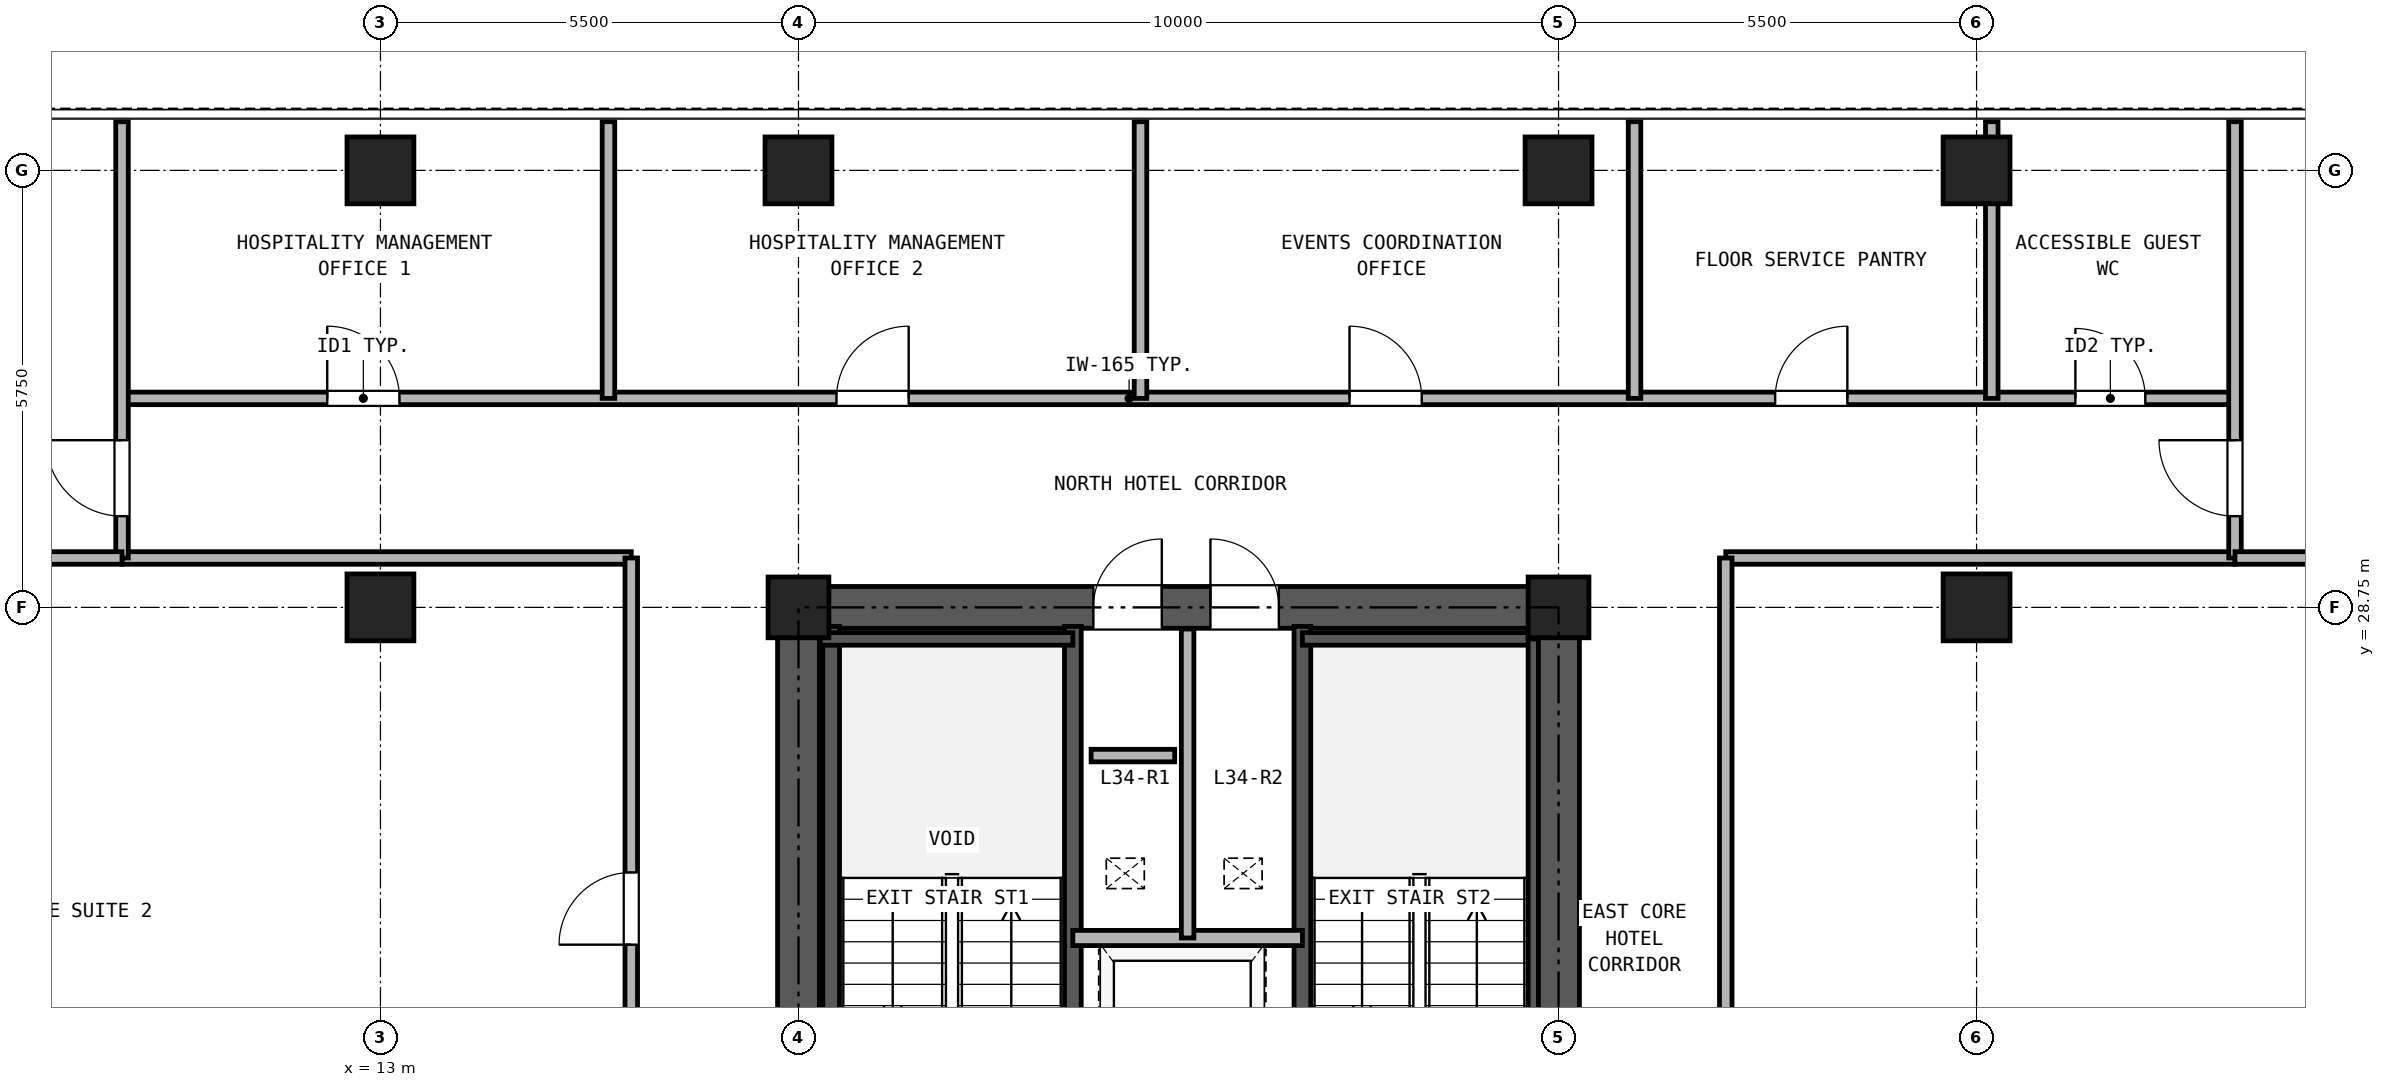
"""IFC4 building model, lengths in metres.
Left out: names, types, materials, properties, quantities, classifications, styles, units other than length and angle.
Written with IfcOpenShell. Run it as: python <this file> out.ifc"""

import sys

from ifc_helpers import new_model, si_unit, direction, frame, frame_2d, origin, origin_2d, place, context, subcontext, project, spatial, rectangle, hollow_rectangle, extrude, source, transform, mapped, element, fill, save


model = new_model("IFC4")
c1 = context("Model", 3, precision=1e-05, world=origin(), true_north=direction((0.0, 1.0)))
c2 = subcontext(c1, "Body", "Model", "MODEL_VIEW")
j1 = project(units=[si_unit("LENGTHUNIT", "METRE"), si_unit("PLANEANGLEUNIT", "RADIAN")], contexts=[c1])
p1 = place(None, origin())
s1 = spatial("IfcSite", under=j1, at=p1, CompositionType="ELEMENT")
p2 = place(p1, origin())
s2 = spatial("IfcBuilding", under=s1, at=p2, CompositionType="ELEMENT")
p3 = place(p2, frame((0.0, 0.0, 124.7)))
s3 = spatial("IfcBuildingStorey", under=s2, at=p3, CompositionType="ELEMENT", Elevation=124.7)
m1 = source(origin(), c2, "Body", "SweptSolid", [
    extrude(hollow_rectangle(XDim=0.88, YDim=0.88, WallThickness=0.05, at=origin_2d()), origin(), (0.0, 0.0, 1.0), 2.95),
])
for number, where, z_axis, x_axis in (
    (1, (13.0, 34.5, 0.0), (0.0, 0.0, 1.0), (1.0, 0.0, 0.0)),
    (2, (18.5, 34.5, 0.0), (0.0, 0.0, 1.0), (1.0, 0.0, 0.0)),
    (3, (28.5, 34.5, 0.0), (0.0, 0.0, 1.0), (1.0, 0.0, 0.0)),
    (4, (34.0, 34.5, 0.0), (0.0, 0.0, 1.0), (1.0, 0.0, 0.0)),
    (5, (13.0, 28.75, 0.0), (0.0, 0.0, 1.0), (1.0, 0.0, 0.0)),
):
    element("IfcColumn", number, at=place(p3, frame(where, z_axis=z_axis, x_axis=x_axis)), inside=s3, PredefinedType="COLUMN", context=c2, shape_type="MappedRepresentation", body=[
        mapped(m1, transform((0.0, 0.0, 0.0), x_axis=(1.0, 0.0, 0.0), y_axis=(0.0, 1.0, 0.0), z_axis=(0.0, 0.0, 1.0), scale=1.0)),
    ])
m2 = source(origin(), c2, "Body", "SweptSolid", [
    extrude(hollow_rectangle(XDim=0.8, YDim=0.8, WallThickness=0.045, at=origin_2d()), origin(), (0.0, 0.0, 1.0), 2.95),
])
for number, where, z_axis, x_axis in (
    (6, (18.5, 28.75, 0.0), (0.0, 0.0, 1.0), (1.0, 0.0, 0.0)),
    (7, (28.5, 28.75, 0.0), (0.0, 0.0, 1.0), (1.0, 0.0, 0.0)),
):
    element("IfcColumn", number, at=place(p3, frame(where, z_axis=z_axis, x_axis=x_axis)), inside=s3, PredefinedType="COLUMN", context=c2, shape_type="MappedRepresentation", body=[
        mapped(m2, transform((0.0, 0.0, 0.0), x_axis=(1.0, 0.0, 0.0), y_axis=(0.0, 1.0, 0.0), z_axis=(0.0, 0.0, 1.0), scale=1.0)),
    ])
p4 = place(p3, frame((34.0, 28.75, 0.0), z_axis=(0.0, 0.0, 1.0), x_axis=(1.0, 0.0, 0.0)))
e8 = element("IfcColumn", 8, at=p4, inside=s3, PredefinedType="COLUMN", context=c2, shape_type="MappedRepresentation", body=[
    mapped(m1, transform((0.0, 0.0, 0.0), x_axis=(1.0, 0.0, 0.0), y_axis=(0.0, 1.0, 0.0), z_axis=(0.0, 0.0, 1.0), scale=1.0)),
])
p5 = place(p3, frame((18.225, 28.75, 0.0), z_axis=(0.0, 0.0, 1.0), x_axis=(1.0, 0.0, 0.0)))
e9 = element("IfcWall", 9, at=p5, inside=s3, PredefinedType="SHEAR", context=c2, shape_type="SweptSolid", body=[
    extrude(rectangle(XDim=10.55, YDim=0.55, at=frame_2d((5.275, 0.0))), origin(), (0.0, 0.0, 1.0), 2.95),
])
p6 = place(p5, frame((4.155, 0.0, 0.0)))
e10 = element("IfcOpeningElement", 10, at=p6, cuts=e9, PredefinedType="OPENING", context=c2, shape_type="SweptSolid", body=[
    extrude(rectangle(XDim=0.9, YDim=2.05, at=frame_2d((0.45, 1.025))), frame((0.0, 0.285, 0.0), z_axis=(0.0, -1.0, 0.0), x_axis=(1.0, 0.0, 0.0)), (0.0, 0.0, 1.0), 0.57),
])
p7 = place(p5, frame((5.695, 0.0, 0.0)))
e11 = element("IfcOpeningElement", 11, at=p7, cuts=e9, PredefinedType="OPENING", context=c2, shape_type="SweptSolid", body=[
    extrude(rectangle(XDim=0.9, YDim=2.05, at=frame_2d((0.45, 1.025))), frame((0.0, 0.285, 0.0), z_axis=(0.0, -1.0, 0.0), x_axis=(1.0, 0.0, 0.0)), (0.0, 0.0, 1.0), 0.57),
])
p8 = place(p3, frame((18.5, 11.775, 0.0), z_axis=(0.0, 0.0, 1.0), x_axis=(0.0, 1.0, 0.0)))
e12 = element("IfcWall", 12, at=p8, inside=s3, PredefinedType="SHEAR", context=c2, shape_type="SweptSolid", body=[
    extrude(rectangle(XDim=16.7, YDim=0.55, at=frame_2d((8.35, 0.0))), origin(), (0.0, 0.0, 1.0), 2.95),
])
p9 = place(p8, frame((7.375, 0.0, 0.0)))
e13 = element("IfcOpeningElement", 13, at=p9, cuts=e12, PredefinedType="OPENING", context=c2, shape_type="SweptSolid", body=[
    extrude(rectangle(XDim=1.15, YDim=2.2, at=frame_2d((0.575, 1.1))), frame((0.0, 0.285, 0.0), z_axis=(0.0, -1.0, 0.0), x_axis=(1.0, 0.0, 0.0)), (0.0, 0.0, 1.0), 0.57),
])
p10 = place(p3, frame((28.5, 11.775, 0.0), z_axis=(0.0, 0.0, 1.0), x_axis=(0.0, 1.0, 0.0)))
e14 = element("IfcWall", 14, at=p10, inside=s3, PredefinedType="SHEAR", context=c2, shape_type="SweptSolid", body=[
    extrude(rectangle(XDim=16.7, YDim=0.55, at=frame_2d((8.35, 0.0))), origin(), (0.0, 0.0, 1.0), 2.95),
])
p11 = place(p10, frame((7.375, 0.0, 0.0)))
e15 = element("IfcOpeningElement", 15, at=p11, cuts=e14, PredefinedType="OPENING", context=c2, shape_type="SweptSolid", body=[
    extrude(rectangle(XDim=1.15, YDim=2.2, at=frame_2d((0.575, 1.1))), frame((0.0, 0.285, 0.0), z_axis=(0.0, -1.0, 0.0), x_axis=(1.0, 0.0, 0.0)), (0.0, 0.0, 1.0), 0.57),
])
for number, where, z_axis, x_axis in (
    (16, (18.93, 21.39, 0.0), (0.0, 0.0, 1.0), (0.0, 1.0, 0.0)),
    (17, (22.11, 21.39, 0.0), (0.0, 0.0, 1.0), (0.0, 1.0, 0.0)),
    (18, (25.13, 21.39, 0.0), (0.0, 0.0, 1.0), (0.0, 1.0, 0.0)),
):
    element("IfcWall", number, at=place(p3, frame(where, z_axis=z_axis, x_axis=x_axis)), inside=s3, PredefinedType="SOLIDWALL", context=c2, shape_type="SweptSolid", body=[
        extrude(rectangle(XDim=7.11, YDim=0.22, at=frame_2d((3.555, 0.0))), origin(), (0.0, 0.0, 1.0), 2.95),
    ])
p12 = place(p3, frame((18.785, 28.335, 0.0), z_axis=(0.0, 0.0, 1.0), x_axis=(1.0, 0.0, 0.0)))
e19 = element("IfcWall", 19, at=p12, inside=s3, PredefinedType="PARTITIONING", context=c2, shape_type="SweptSolid", body=[
    extrude(rectangle(XDim=3.325, YDim=0.165, at=frame_2d((1.663, 0.0))), origin(), (0.0, 0.0, 1.0), 2.95),
])
p13 = place(p3, frame((25.13, 28.335, 0.0), z_axis=(0.0, 0.0, 1.0), x_axis=(1.0, 0.0, 0.0)))
e20 = element("IfcWall", 20, at=p13, inside=s3, PredefinedType="PARTITIONING", context=c2, shape_type="SweptSolid", body=[
    extrude(rectangle(XDim=3.085, YDim=0.165, at=frame_2d((1.542, 0.0))), origin(), (0.0, 0.0, 1.0), 2.95),
])
p14 = place(p3, frame((28.167, 21.39, 0.0), z_axis=(0.0, 0.0, 1.0), x_axis=(0.0, 1.0, 0.0)))
e21 = element("IfcWall", 21, at=p14, inside=s3, PredefinedType="PARTITIONING", context=c2, shape_type="SweptSolid", body=[
    extrude(rectangle(XDim=6.945, YDim=0.135, at=frame_2d((3.473, 0.0))), origin(), (0.0, 0.0, 1.0), 2.95),
])
p15 = place(p3, frame((22.11, 24.4, 0.0), z_axis=(0.0, 0.0, 1.0), x_axis=(1.0, 0.0, 0.0)))
e22 = element("IfcWall", 22, at=p15, inside=s3, PredefinedType="PARTITIONING", context=c2, shape_type="SweptSolid", body=[
    extrude(rectangle(XDim=3.02, YDim=0.2, at=frame_2d((1.51, 0.0))), origin(), (0.0, 0.0, 1.0), 2.95),
])
p16 = place(p3, frame((23.62, 24.4, 0.0), z_axis=(0.0, 0.0, 1.0), x_axis=(0.0, 1.0, 0.0)))
e23 = element("IfcWall", 23, at=p16, inside=s3, PredefinedType="PARTITIONING", context=c2, shape_type="SweptSolid", body=[
    extrude(rectangle(XDim=4.065, YDim=0.165, at=frame_2d((2.033, 0.0))), origin(), (0.0, 0.0, 1.0), 2.95),
])
p17 = place(p3, frame((9.6, 31.5, 0.0), z_axis=(0.0, 0.0, 1.0), x_axis=(1.0, 0.0, 0.0)))
e24 = element("IfcWall", 24, at=p17, inside=s3, PredefinedType="PARTITIONING", context=c2, shape_type="SweptSolid", body=[
    extrude(rectangle(XDim=27.8, YDim=0.165, at=frame_2d((13.9, 0.0))), origin(), (0.0, 0.0, 1.0), 2.583),
])
p18 = place(p17, frame((2.7, 0.0, 0.0)))
e25 = element("IfcOpeningElement", 25, at=p18, cuts=e24, PredefinedType="OPENING", context=c2, shape_type="SweptSolid", body=[
    extrude(rectangle(XDim=0.95, YDim=2.15, at=frame_2d((0.475, 1.075))), frame((0.0, 0.093, 0.0), z_axis=(0.0, -1.0, 0.0), x_axis=(1.0, 0.0, 0.0)), (0.0, 0.0, 1.0), 0.185),
])
p19 = place(p17, frame((9.4, 0.0, 0.0)))
e26 = element("IfcOpeningElement", 26, at=p19, cuts=e24, PredefinedType="OPENING", context=c2, shape_type="SweptSolid", body=[
    extrude(rectangle(XDim=0.95, YDim=2.15, at=frame_2d((0.475, 1.075))), frame((0.0, 0.093, 0.0), z_axis=(0.0, -1.0, 0.0), x_axis=(1.0, 0.0, 0.0)), (0.0, 0.0, 1.0), 0.185),
])
p20 = place(p17, frame((16.15, 0.0, 0.0)))
e27 = element("IfcOpeningElement", 27, at=p20, cuts=e24, PredefinedType="OPENING", context=c2, shape_type="SweptSolid", body=[
    extrude(rectangle(XDim=0.95, YDim=2.15, at=frame_2d((0.475, 1.075))), frame((0.0, 0.093, 0.0), z_axis=(0.0, -1.0, 0.0), x_axis=(1.0, 0.0, 0.0)), (0.0, 0.0, 1.0), 0.185),
])
p21 = place(p17, frame((21.75, 0.0, 0.0)))
e28 = element("IfcOpeningElement", 28, at=p21, cuts=e24, PredefinedType="OPENING", context=c2, shape_type="SweptSolid", body=[
    extrude(rectangle(XDim=0.95, YDim=2.15, at=frame_2d((0.475, 1.075))), frame((0.0, 0.093, 0.0), z_axis=(0.0, -1.0, 0.0), x_axis=(1.0, 0.0, 0.0)), (0.0, 0.0, 1.0), 0.185),
])
p22 = place(p17, frame((25.7, 0.0, 0.0)))
e29 = element("IfcOpeningElement", 29, at=p22, cuts=e24, PredefinedType="OPENING", context=c2, shape_type="SweptSolid", body=[
    extrude(rectangle(XDim=0.92, YDim=2.1, at=frame_2d((0.46, 1.05))), frame((0.0, 0.093, 0.0), z_axis=(0.0, -1.0, 0.0), x_axis=(1.0, 0.0, 0.0)), (0.0, 0.0, 1.0), 0.185),
])
for number, where, z_axis, x_axis in (
    (30, (9.6, 29.4, 0.0), (0.0, 0.0, 1.0), (1.0, 0.0, 0.0)),
    (31, (30.7, 29.4, 0.0), (0.0, 0.0, 1.0), (1.0, 0.0, 0.0)),
):
    element("IfcWall", number, at=place(p3, frame(where, z_axis=z_axis, x_axis=x_axis)), inside=s3, PredefinedType="PARTITIONING", context=c2, shape_type="SweptSolid", body=[
        extrude(rectangle(XDim=6.7, YDim=0.165, at=frame_2d((3.35, 0.0))), origin(), (0.0, 0.0, 1.0), 2.95),
    ])
p23 = place(p3, frame((16.3, 11.05, 0.0), z_axis=(0.0, 0.0, 1.0), x_axis=(0.0, 1.0, 0.0)))
e32 = element("IfcWall", 32, at=p23, inside=s3, PredefinedType="PARTITIONING", context=c2, shape_type="SweptSolid", body=[
    extrude(rectangle(XDim=18.35, YDim=0.165, at=frame_2d((9.175, 0.0))), origin(), (0.0, 0.0, 1.0), 2.95),
])
p24 = place(p23, frame((4.087, 0.0, 0.0)))
e33 = element("IfcOpeningElement", 33, at=p24, cuts=e32, PredefinedType="OPENING", context=c2, shape_type="SweptSolid", body=[
    extrude(rectangle(XDim=0.95, YDim=2.15, at=frame_2d((0.475, 1.075))), frame((0.0, 0.093, 0.0), z_axis=(0.0, -1.0, 0.0), x_axis=(1.0, 0.0, 0.0)), (0.0, 0.0, 1.0), 0.185),
])
p25 = place(p23, frame((13.262, 0.0, 0.0)))
e34 = element("IfcOpeningElement", 34, at=p25, cuts=e32, PredefinedType="OPENING", context=c2, shape_type="SweptSolid", body=[
    extrude(rectangle(XDim=0.95, YDim=2.15, at=frame_2d((0.475, 1.075))), frame((0.0, 0.093, 0.0), z_axis=(0.0, -1.0, 0.0), x_axis=(1.0, 0.0, 0.0)), (0.0, 0.0, 1.0), 0.185),
])
p26 = place(p3, frame((30.7, 11.05, 0.0), z_axis=(0.0, 0.0, 1.0), x_axis=(0.0, 1.0, 0.0)))
e35 = element("IfcWall", 35, at=p26, inside=s3, PredefinedType="PARTITIONING", context=c2, shape_type="SweptSolid", body=[
    extrude(rectangle(XDim=18.35, YDim=0.165, at=frame_2d((9.175, 0.0))), origin(), (0.0, 0.0, 1.0), 2.95),
])
p27 = place(p26, frame((8.675, 0.0, 0.0)))
e36 = element("IfcOpeningElement", 36, at=p27, cuts=e35, PredefinedType="OPENING", context=c2, shape_type="SweptSolid", body=[
    extrude(rectangle(XDim=0.95, YDim=2.15, at=frame_2d((0.475, 1.075))), frame((0.0, 0.093, 0.0), z_axis=(0.0, -1.0, 0.0), x_axis=(1.0, 0.0, 0.0)), (0.0, 0.0, 1.0), 0.185),
])
p28 = place(p3, frame((9.6, 29.4, 0.0), z_axis=(0.0, 0.0, 1.0), x_axis=(0.0, 1.0, 0.0)))
e37 = element("IfcWall", 37, at=p28, inside=s3, PredefinedType="PARTITIONING", context=c2, shape_type="SweptSolid", body=[
    extrude(rectangle(XDim=5.74, YDim=0.165, at=frame_2d((2.87, 0.0))), origin(), (0.0, 0.0, 1.0), 2.95),
])
p29 = place(p28, frame((0.55, 0.0, 0.0)))
e38 = element("IfcOpeningElement", 38, at=p29, cuts=e37, PredefinedType="OPENING", context=c2, shape_type="SweptSolid", body=[
    extrude(rectangle(XDim=1.0, YDim=2.15, at=frame_2d((0.5, 1.075))), frame((0.0, 0.093, 0.0), z_axis=(0.0, -1.0, 0.0), x_axis=(1.0, 0.0, 0.0)), (0.0, 0.0, 1.0), 0.185),
])
p30 = place(p3, frame((37.4, 29.4, 0.0), z_axis=(0.0, 0.0, 1.0), x_axis=(0.0, 1.0, 0.0)))
e39 = element("IfcWall", 39, at=p30, inside=s3, PredefinedType="PARTITIONING", context=c2, shape_type="SweptSolid", body=[
    extrude(rectangle(XDim=5.74, YDim=0.165, at=frame_2d((2.87, 0.0))), origin(), (0.0, 0.0, 1.0), 2.95),
])
p31 = place(p30, frame((0.55, 0.0, 0.0)))
e40 = element("IfcOpeningElement", 40, at=p31, cuts=e39, PredefinedType="OPENING", context=c2, shape_type="SweptSolid", body=[
    extrude(rectangle(XDim=1.0, YDim=2.15, at=frame_2d((0.5, 1.075))), frame((0.0, 0.093, 0.0), z_axis=(0.0, -1.0, 0.0), x_axis=(1.0, 0.0, 0.0)), (0.0, 0.0, 1.0), 0.185),
])
for number, where, z_axis, x_axis in (
    (41, (0.16, 29.4, 0.0), (0.0, 0.0, 1.0), (1.0, 0.0, 0.0)),
    (42, (37.4, 29.4, 0.0), (0.0, 0.0, 1.0), (1.0, 0.0, 0.0)),
):
    element("IfcWall", number, at=place(p3, frame(where, z_axis=z_axis, x_axis=x_axis)), inside=s3, PredefinedType="PARTITIONING", context=c2, shape_type="SweptSolid", body=[
        extrude(rectangle(XDim=9.44, YDim=0.165, at=frame_2d((4.72, 0.0))), origin(), (0.0, 0.0, 1.0), 2.95),
    ])
for number, where, z_axis, x_axis in (
    (43, (16.0, 31.5, 0.0), (0.0, 0.0, 1.0), (0.0, 1.0, 0.0)),
    (44, (23.0, 31.5, 0.0), (0.0, 0.0, 1.0), (0.0, 1.0, 0.0)),
    (45, (29.5, 31.5, 0.0), (0.0, 0.0, 1.0), (0.0, 1.0, 0.0)),
):
    element("IfcWall", number, at=place(p3, frame(where, z_axis=z_axis, x_axis=x_axis)), inside=s3, PredefinedType="PARTITIONING", context=c2, shape_type="SweptSolid", body=[
        extrude(rectangle(XDim=3.64, YDim=0.165, at=frame_2d((1.82, 0.0))), origin(), (0.0, 0.0, 1.0), 2.95),
    ])
p32 = place(p3, frame((34.2, 31.5, 0.0), z_axis=(0.0, 0.0, 1.0), x_axis=(0.0, 1.0, 0.0)))
e46 = element("IfcWall", 46, at=p32, inside=s3, PredefinedType="PARTITIONING", context=c2, shape_type="SweptSolid", body=[
    extrude(rectangle(XDim=3.64, YDim=0.165, at=frame_2d((1.82, 0.0))), origin(), (0.0, 0.0, 1.0), 2.247),
])
p33 = place(p3, frame((22.35, 26.8, 0.0), z_axis=(0.0, 0.0, 1.0), x_axis=(1.0, 0.0, 0.0)))
e47 = element("IfcWall", 47, at=p33, inside=s3, PredefinedType="PARTITIONING", context=c2, shape_type="SweptSolid", body=[
    extrude(rectangle(XDim=1.1, YDim=0.165, at=frame_2d((0.55, 0.0))), origin(), (0.0, 0.0, 1.0), 2.95),
])
p34 = place(p6, origin())
e48 = element("IfcDoor", 48, at=p34, inside=s3, OperationType="SINGLE_SWING_RIGHT", PredefinedType="DOOR", context=c2, shape_type="SweptSolid", body=[
    extrude(rectangle(XDim=0.9, YDim=2.05, at=frame_2d((0.45, 1.025))), frame((0.0, 0.025, 0.0), z_axis=(0.0, -1.0, 0.0), x_axis=(1.0, 0.0, 0.0)), (0.0, 0.0, 1.0), 0.05),
])
fill(e10, e48)
p35 = place(p7, origin())
e49 = element("IfcDoor", 49, at=p35, inside=s3, OperationType="SINGLE_SWING_LEFT", PredefinedType="DOOR", context=c2, shape_type="SweptSolid", body=[
    extrude(rectangle(XDim=0.9, YDim=2.05, at=frame_2d((0.45, 1.025))), frame((0.0, 0.025, 0.0), z_axis=(0.0, -1.0, 0.0), x_axis=(1.0, 0.0, 0.0)), (0.0, 0.0, 1.0), 0.05),
])
fill(e11, e49)
p36 = place(p29, origin())
e50 = element("IfcDoor", 50, at=p36, inside=s3, OperationType="SINGLE_SWING_RIGHT", PredefinedType="DOOR", context=c2, shape_type="SweptSolid", body=[
    extrude(rectangle(XDim=1.0, YDim=2.15, at=frame_2d((0.5, 1.075))), frame((0.0, 0.025, 0.0), z_axis=(0.0, -1.0, 0.0), x_axis=(1.0, 0.0, 0.0)), (0.0, 0.0, 1.0), 0.05),
])
fill(e38, e50)
p37 = place(p31, frame((1.0, 0.0, 0.0), z_axis=(0.0, 0.0, 1.0), x_axis=(-1.0, 0.0, 0.0)))
e51 = element("IfcDoor", 51, at=p37, inside=s3, OperationType="SINGLE_SWING_RIGHT", PredefinedType="DOOR", context=c2, shape_type="SweptSolid", body=[
    extrude(rectangle(XDim=1.0, YDim=2.15, at=frame_2d((0.5, 1.075))), frame((0.0, 0.025, 0.0), z_axis=(0.0, -1.0, 0.0), x_axis=(1.0, 0.0, 0.0)), (0.0, 0.0, 1.0), 0.05),
])
fill(e40, e51)
p38 = place(p18, origin())
e52 = element("IfcDoor", 52, at=p38, inside=s3, OperationType="SINGLE_SWING_LEFT", PredefinedType="DOOR", context=c2, shape_type="SweptSolid", body=[
    extrude(rectangle(XDim=0.95, YDim=2.15, at=frame_2d((0.475, 1.075))), frame((0.0, 0.025, 0.0), z_axis=(0.0, -1.0, 0.0), x_axis=(1.0, 0.0, 0.0)), (0.0, 0.0, 1.0), 0.05),
])
fill(e25, e52)
p39 = place(p19, origin())
e53 = element("IfcDoor", 53, at=p39, inside=s3, OperationType="SINGLE_SWING_RIGHT", PredefinedType="DOOR", context=c2, shape_type="SweptSolid", body=[
    extrude(rectangle(XDim=0.95, YDim=2.15, at=frame_2d((0.475, 1.075))), frame((0.0, 0.025, 0.0), z_axis=(0.0, -1.0, 0.0), x_axis=(1.0, 0.0, 0.0)), (0.0, 0.0, 1.0), 0.05),
])
fill(e26, e53)
p40 = place(p20, origin())
e54 = element("IfcDoor", 54, at=p40, inside=s3, OperationType="SINGLE_SWING_LEFT", PredefinedType="DOOR", context=c2, shape_type="SweptSolid", body=[
    extrude(rectangle(XDim=0.95, YDim=2.15, at=frame_2d((0.475, 1.075))), frame((0.0, 0.025, 0.0), z_axis=(0.0, -1.0, 0.0), x_axis=(1.0, 0.0, 0.0)), (0.0, 0.0, 1.0), 0.05),
])
fill(e27, e54)
p41 = place(p21, origin())
e55 = element("IfcDoor", 55, at=p41, inside=s3, OperationType="SINGLE_SWING_RIGHT", PredefinedType="DOOR", context=c2, shape_type="SweptSolid", body=[
    extrude(rectangle(XDim=0.95, YDim=2.15, at=frame_2d((0.475, 1.075))), frame((0.0, 0.025, 0.0), z_axis=(0.0, -1.0, 0.0), x_axis=(1.0, 0.0, 0.0)), (0.0, 0.0, 1.0), 0.05),
])
fill(e28, e55)
p42 = place(p22, origin())
e56 = element("IfcDoor", 56, at=p42, inside=s3, OperationType="SINGLE_SWING_LEFT", PredefinedType="DOOR", context=c2, shape_type="SweptSolid", body=[
    extrude(rectangle(XDim=0.92, YDim=2.1, at=frame_2d((0.46, 1.05))), frame((0.0, 0.025, 0.0), z_axis=(0.0, -1.0, 0.0), x_axis=(1.0, 0.0, 0.0)), (0.0, 0.0, 1.0), 0.05),
])
fill(e29, e56)
p43 = place(p25, frame((0.95, 0.0, 0.0), z_axis=(0.0, 0.0, 1.0), x_axis=(-1.0, 0.0, 0.0)))
e57 = element("IfcDoor", 57, at=p43, inside=s3, OperationType="SINGLE_SWING_LEFT", PredefinedType="DOOR", context=c2, shape_type="SweptSolid", body=[
    extrude(rectangle(XDim=0.95, YDim=2.15, at=frame_2d((0.475, 1.075))), frame((0.0, 0.025, 0.0), z_axis=(0.0, -1.0, 0.0), x_axis=(1.0, 0.0, 0.0)), (0.0, 0.0, 1.0), 0.05),
])
fill(e34, e57)
save(model, sys.argv[1])
